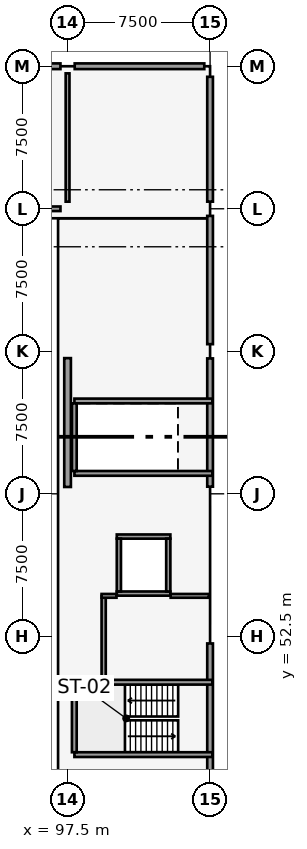
"""IFC4 building model, lengths in metres.
Left out: names, types, materials, properties, quantities, classifications, styles, units other than length and angle.
Written with IfcOpenShell. Run it as: python <this file> out.ifc"""

import sys

from ifc_helpers import new_model, si_unit, direction, frame, frame_2d, origin, origin_2d, place, context, subcontext, project, spatial, rectangle, extrude, element, fill, save


model = new_model("IFC4")
c1 = context("Model", 3, precision=1e-05, world=origin(), true_north=direction((0.0, 1.0)))
c2 = subcontext(c1, "Body", "Model", "MODEL_VIEW")
j1 = project(units=[si_unit("LENGTHUNIT", "METRE"), si_unit("PLANEANGLEUNIT", "RADIAN")], contexts=[c1])
p1 = place(None, origin())
s1 = spatial("IfcSite", under=j1, at=p1, CompositionType="ELEMENT")
p2 = place(p1, origin())
s2 = spatial("IfcBuilding", under=s1, at=p2, CompositionType="ELEMENT")
p3 = place(p2, frame((0.0, 0.0, 13.2)))
s3 = spatial("IfcBuildingStorey", under=s2, at=p3, CompositionType="ELEMENT", Elevation=13.2)
for number, where, z_axis, x_axis in (
    (1, (97.5, 52.5, 0.0), (0.0, 0.0, 1.0), (1.0, 0.0, 0.0)),
    (2, (97.5, 60.0, 0.0), (0.0, 0.0, 1.0), (1.0, 0.0, 0.0)),
    (3, (97.5, 67.5, 0.0), (0.0, 0.0, 1.0), (1.0, 0.0, 0.0)),
    (4, (97.5, 75.0, 0.0), (0.0, 0.0, 1.0), (1.0, 0.0, 0.0)),
    (5, (97.5, 82.5, 0.0), (0.0, 0.0, 1.0), (1.0, 0.0, 0.0)),
    (6, (105.0, 52.5, 0.0), (0.0, 0.0, 1.0), (1.0, 0.0, 0.0)),
    (7, (105.0, 60.0, 0.0), (0.0, 0.0, 1.0), (1.0, 0.0, 0.0)),
    (8, (105.0, 67.5, 0.0), (0.0, 0.0, 1.0), (1.0, 0.0, 0.0)),
    (9, (105.0, 75.0, 0.0), (0.0, 0.0, 1.0), (1.0, 0.0, 0.0)),
):
    element("IfcColumn", number, at=place(p3, frame(where, z_axis=z_axis, x_axis=x_axis)), inside=s3, PredefinedType="COLUMN", context=c2, shape_type="SweptSolid", body=[
        extrude(rectangle(XDim=0.72, YDim=0.72, at=origin_2d()), origin(), (0.0, 0.0, 1.0), 3.9),
    ])
p4 = place(p3, frame((105.0, 82.5, 0.0), z_axis=(0.0, 0.0, 1.0), x_axis=(1.0, 0.0, 0.0)))
e10 = element("IfcColumn", 10, at=p4, inside=s3, PredefinedType="COLUMN", context=c2, shape_type="SweptSolid", body=[
    extrude(rectangle(XDim=0.6, YDim=1.1, at=origin_2d()), origin(), (0.0, 0.0, 1.0), 3.9),
])
p5 = place(p3, frame((97.5, 60.36, 0.0), z_axis=(0.0, 0.0, 1.0), x_axis=(0.0, 1.0, 0.0)))
e11 = element("IfcWall", 11, at=p5, inside=s3, PredefinedType="SHEAR", context=c2, shape_type="SweptSolid", body=[
    extrude(rectangle(XDim=6.78, YDim=0.35, at=frame_2d((3.39, 0.0))), origin(), (0.0, 0.0, 1.0), 2.67),
])
p6 = place(p3, frame((105.0, 45.375, 0.0), z_axis=(0.0, 0.0, 1.0), x_axis=(0.0, 1.0, 0.0)))
e12 = element("IfcWall", 12, at=p6, inside=s3, PredefinedType="SOLIDWALL", context=c2, shape_type="SweptSolid", body=[
    extrude(rectangle(XDim=6.75, YDim=0.3, at=frame_2d((3.375, 0.0))), origin(), (0.0, 0.0, 1.0), 2.54),
])
p7 = place(p3, frame((105.0, 60.375, 0.0), z_axis=(0.0, 0.0, 1.0), x_axis=(0.0, 1.0, 0.0)))
e13 = element("IfcWall", 13, at=p7, inside=s3, PredefinedType="SOLIDWALL", context=c2, shape_type="SweptSolid", body=[
    extrude(rectangle(XDim=6.75, YDim=0.3, at=frame_2d((3.375, 0.0))), origin(), (0.0, 0.0, 1.0), 2.64),
])
p8 = place(p3, frame((105.0, 67.875, 0.0), z_axis=(0.0, 0.0, 1.0), x_axis=(0.0, 1.0, 0.0)))
e14 = element("IfcWall", 14, at=p8, inside=s3, PredefinedType="SOLIDWALL", context=c2, shape_type="SweptSolid", body=[
    extrude(rectangle(XDim=6.75, YDim=0.3, at=frame_2d((3.375, 0.0))), origin(), (0.0, 0.0, 1.0), 2.69),
])
p9 = place(p3, frame((105.0, 75.375, 0.0), z_axis=(0.0, 0.0, 1.0), x_axis=(0.0, 1.0, 0.0)))
e15 = element("IfcWall", 15, at=p9, inside=s3, PredefinedType="SOLIDWALL", context=c2, shape_type="SweptSolid", body=[
    extrude(rectangle(XDim=6.57, YDim=0.3, at=frame_2d((3.285, 0.0))), origin(), (0.0, 0.0, 1.0), 2.74),
])
p10 = place(p9, frame((1.21, 0.0, 0.6)))
e16 = element("IfcOpeningElement", 16, at=p10, cuts=e15, PredefinedType="OPENING", context=c2, shape_type="SweptSolid", body=[
    extrude(rectangle(XDim=1.2, YDim=1.2, at=frame_2d((0.6, 0.6))), frame((0.0, 0.16, 0.0), z_axis=(0.0, -1.0, 0.0), x_axis=(1.0, 0.0, 0.0)), (0.0, 0.0, 1.0), 0.32),
])
p11 = place(p3, frame((90.375, 82.5, 0.0), z_axis=(0.0, 0.0, 1.0), x_axis=(1.0, 0.0, 0.0)))
e17 = element("IfcWall", 17, at=p11, inside=s3, PredefinedType="SOLIDWALL", context=c2, shape_type="SweptSolid", body=[
    extrude(rectangle(XDim=6.75, YDim=0.3, at=frame_2d((3.375, 0.0))), origin(), (0.0, 0.0, 1.0), 2.84),
])
p12 = place(p11, frame((2.625, 0.0, 0.6)))
e18 = element("IfcOpeningElement", 18, at=p12, cuts=e17, PredefinedType="OPENING", context=c2, shape_type="SweptSolid", body=[
    extrude(rectangle(XDim=1.5, YDim=1.2, at=frame_2d((0.75, 0.6))), frame((0.0, 0.16, 0.0), z_axis=(0.0, -1.0, 0.0), x_axis=(1.0, 0.0, 0.0)), (0.0, 0.0, 1.0), 0.32),
])
p13 = place(p3, frame((97.875, 82.5, 0.0), z_axis=(0.0, 0.0, 1.0), x_axis=(1.0, 0.0, 0.0)))
e19 = element("IfcWall", 19, at=p13, inside=s3, PredefinedType="SOLIDWALL", context=c2, shape_type="SweptSolid", body=[
    extrude(rectangle(XDim=6.82, YDim=0.3, at=frame_2d((3.41, 0.0))), origin(), (0.0, 0.0, 1.0), 2.84),
])
p14 = place(p13, frame((2.475, 0.0, 0.6)))
e20 = element("IfcOpeningElement", 20, at=p14, cuts=e19, PredefinedType="OPENING", context=c2, shape_type="SweptSolid", body=[
    extrude(rectangle(XDim=1.8, YDim=1.2, at=frame_2d((0.9, 0.6))), frame((0.0, 0.16, 0.0), z_axis=(0.0, -1.0, 0.0), x_axis=(1.0, 0.0, 0.0)), (0.0, 0.0, 1.0), 0.32),
])
p15 = place(p3, frame((97.86, 46.275, 0.0), z_axis=(0.0, 0.0, 1.0), x_axis=(1.0, 0.0, 0.0)))
e21 = element("IfcWall", 21, at=p15, inside=s3, PredefinedType="SOLIDWALL", context=c2, shape_type="SweptSolid", body=[
    extrude(rectangle(XDim=7.26, YDim=0.25, at=frame_2d((3.63, 0.0))), origin(), (0.0, 0.0, 1.0), 3.62),
])
p16 = place(p15, frame((5.54, 0.0, 0.0)))
e22 = element("IfcOpeningElement", 22, at=p16, cuts=e21, PredefinedType="OPENING", context=c2, shape_type="SweptSolid", body=[
    extrude(rectangle(XDim=1.1, YDim=2.15, at=frame_2d((0.55, 1.075))), frame((0.0, 0.135, 0.0), z_axis=(0.0, -1.0, 0.0), x_axis=(1.0, 0.0, 0.0)), (0.0, 0.0, 1.0), 0.27),
])
p17 = place(p3, frame((97.86, 50.085, 0.0), z_axis=(0.0, 0.0, 1.0), x_axis=(1.0, 0.0, 0.0)))
e23 = element("IfcWall", 23, at=p17, inside=s3, PredefinedType="SOLIDWALL", context=c2, shape_type="SweptSolid", body=[
    extrude(rectangle(XDim=7.26, YDim=0.25, at=frame_2d((3.63, 0.0))), origin(), (0.0, 0.0, 1.0), 3.62),
])
p18 = place(p17, frame((5.54, 0.0, 0.0)))
e24 = element("IfcOpeningElement", 24, at=p18, cuts=e23, PredefinedType="OPENING", context=c2, shape_type="SweptSolid", body=[
    extrude(rectangle(XDim=1.1, YDim=2.15, at=frame_2d((0.55, 1.075))), frame((0.0, 0.135, 0.0), z_axis=(0.0, -1.0, 0.0), x_axis=(1.0, 0.0, 0.0)), (0.0, 0.0, 1.0), 0.27),
])
p19 = place(p3, frame((97.855, 46.4, 0.0), z_axis=(0.0, 0.0, 1.0), x_axis=(0.0, 1.0, 0.0)))
e25 = element("IfcWall", 25, at=p19, inside=s3, PredefinedType="SOLIDWALL", context=c2, shape_type="SweptSolid", body=[
    extrude(rectangle(XDim=3.56, YDim=0.25, at=frame_2d((1.78, 0.0))), origin(), (0.0, 0.0, 1.0), 3.62),
])
p20 = place(p3, frame((97.86, 61.075, 0.0), z_axis=(0.0, 0.0, 1.0), x_axis=(1.0, 0.0, 0.0)))
e26 = element("IfcWall", 26, at=p20, inside=s3, PredefinedType="SOLIDWALL", context=c2, shape_type="SweptSolid", body=[
    extrude(rectangle(XDim=7.26, YDim=0.25, at=frame_2d((3.63, 0.0))), origin(), (0.0, 0.0, 1.0), 3.62),
])
p21 = place(p20, frame((5.54, 0.0, 0.0)))
e27 = element("IfcOpeningElement", 27, at=p21, cuts=e26, PredefinedType="OPENING", context=c2, shape_type="SweptSolid", body=[
    extrude(rectangle(XDim=1.1, YDim=2.15, at=frame_2d((0.55, 1.075))), frame((0.0, 0.135, 0.0), z_axis=(0.0, -1.0, 0.0), x_axis=(1.0, 0.0, 0.0)), (0.0, 0.0, 1.0), 0.27),
])
p22 = place(p3, frame((97.86, 64.885, 0.0), z_axis=(0.0, 0.0, 1.0), x_axis=(1.0, 0.0, 0.0)))
e28 = element("IfcWall", 28, at=p22, inside=s3, PredefinedType="SOLIDWALL", context=c2, shape_type="SweptSolid", body=[
    extrude(rectangle(XDim=7.26, YDim=0.25, at=frame_2d((3.63, 0.0))), origin(), (0.0, 0.0, 1.0), 3.62),
])
p23 = place(p22, frame((5.54, 0.0, 0.0)))
e29 = element("IfcOpeningElement", 29, at=p23, cuts=e28, PredefinedType="OPENING", context=c2, shape_type="SweptSolid", body=[
    extrude(rectangle(XDim=1.1, YDim=2.15, at=frame_2d((0.55, 1.075))), frame((0.0, 0.135, 0.0), z_axis=(0.0, -1.0, 0.0), x_axis=(1.0, 0.0, 0.0)), (0.0, 0.0, 1.0), 0.27),
])
p24 = place(p3, frame((97.855, 61.2, 0.0), z_axis=(0.0, 0.0, 1.0), x_axis=(0.0, 1.0, 0.0)))
e30 = element("IfcWall", 30, at=p24, inside=s3, PredefinedType="SOLIDWALL", context=c2, shape_type="SweptSolid", body=[
    extrude(rectangle(XDim=3.56, YDim=0.25, at=frame_2d((1.78, 0.0))), origin(), (0.0, 0.0, 1.0), 3.62),
])
p25 = place(p3, frame((100.09, 54.75, 0.0), z_axis=(0.0, 0.0, 1.0), x_axis=(1.0, 0.0, 0.0)))
e31 = element("IfcWall", 31, at=p25, inside=s3, PredefinedType="SOLIDWALL", context=c2, shape_type="SweptSolid", body=[
    extrude(rectangle(XDim=2.82, YDim=0.22, at=frame_2d((1.41, 0.0))), origin(), (0.0, 0.0, 1.0), 3.62),
])
p26 = place(p25, frame((0.86, 0.0, 0.0)))
e32 = element("IfcOpeningElement", 32, at=p26, cuts=e31, PredefinedType="OPENING", context=c2, shape_type="SweptSolid", body=[
    extrude(rectangle(XDim=1.1, YDim=2.15, at=frame_2d((0.55, 1.075))), frame((0.0, 0.12, 0.0), z_axis=(0.0, -1.0, 0.0), x_axis=(1.0, 0.0, 0.0)), (0.0, 0.0, 1.0), 0.24),
])
p27 = place(p3, frame((100.09, 57.75, 0.0), z_axis=(0.0, 0.0, 1.0), x_axis=(1.0, 0.0, 0.0)))
e33 = element("IfcWall", 33, at=p27, inside=s3, PredefinedType="SOLIDWALL", context=c2, shape_type="SweptSolid", body=[
    extrude(rectangle(XDim=2.82, YDim=0.22, at=frame_2d((1.41, 0.0))), origin(), (0.0, 0.0, 1.0), 3.62),
])
for number, where, z_axis, x_axis in (
    (34, (100.2, 54.86, 0.0), (0.0, 0.0, 1.0), (0.0, 1.0, 0.0)),
    (35, (102.8, 54.86, 0.0), (0.0, 0.0, 1.0), (0.0, 1.0, 0.0)),
):
    element("IfcWall", number, at=place(p3, frame(where, z_axis=z_axis, x_axis=x_axis)), inside=s3, PredefinedType="SOLIDWALL", context=c2, shape_type="SweptSolid", body=[
        extrude(rectangle(XDim=2.78, YDim=0.22, at=frame_2d((1.39, 0.0))), origin(), (0.0, 0.0, 1.0), 3.62),
    ])
p28 = place(p3, frame((99.4, 50.22, 0.0), z_axis=(0.0, 0.0, 1.0), x_axis=(0.0, 1.0, 0.0)))
e36 = element("IfcWall", 36, at=p28, inside=s3, PredefinedType="SOLIDWALL", context=c2, shape_type="SweptSolid", body=[
    extrude(rectangle(XDim=4.41, YDim=0.22, at=frame_2d((2.205, 0.0))), origin(), (0.0, 0.0, 1.0), 3.62),
])
p29 = place(p28, frame((0.45, 0.0, 0.0)))
e37 = element("IfcOpeningElement", 37, at=p29, cuts=e36, PredefinedType="OPENING", context=c2, shape_type="SweptSolid", body=[
    extrude(rectangle(XDim=1.1, YDim=2.15, at=frame_2d((0.55, 1.075))), frame((0.0, 0.12, 0.0), z_axis=(0.0, -1.0, 0.0), x_axis=(1.0, 0.0, 0.0)), (0.0, 0.0, 1.0), 0.24),
])
p30 = place(p3, frame((99.29, 54.63, 0.0), z_axis=(0.0, 0.0, 1.0), x_axis=(1.0, 0.0, 0.0)))
e38 = element("IfcWall", 38, at=p30, inside=s3, PredefinedType="PARTITIONING", context=c2, shape_type="SweptSolid", body=[
    extrude(rectangle(XDim=0.785, YDim=0.2, at=frame_2d((0.393, 0.0))), origin(), (0.0, 0.0, 1.0), 3.6),
])
p31 = place(p3, frame((102.925, 54.63, 0.0), z_axis=(0.0, 0.0, 1.0), x_axis=(1.0, 0.0, 0.0)))
e39 = element("IfcWall", 39, at=p31, inside=s3, PredefinedType="PARTITIONING", context=c2, shape_type="SweptSolid", body=[
    extrude(rectangle(XDim=2.015, YDim=0.2, at=frame_2d((1.007, 0.0))), origin(), (0.0, 0.0, 1.0), 2.85),
])
p32 = place(p3, frame((90.374, 75.0, 0.0), z_axis=(0.0, 0.0, 1.0), x_axis=(1.0, 0.0, 0.0)))
e40 = element("IfcWall", 40, at=p32, inside=s3, PredefinedType="PARTITIONING", context=c2, shape_type="SweptSolid", body=[
    extrude(rectangle(XDim=6.752, YDim=0.24, at=frame_2d((3.376, 0.0))), origin(), (0.0, 0.0, 1.0), 2.54),
])
p33 = place(p3, frame((97.5, 75.374, 0.0), z_axis=(0.0, 0.0, 1.0), x_axis=(0.0, 1.0, 0.0)))
e41 = element("IfcWall", 41, at=p33, inside=s3, PredefinedType="PARTITIONING", context=c2, shape_type="SweptSolid", body=[
    extrude(rectangle(XDim=6.752, YDim=0.2, at=frame_2d((3.376, 0.0))), origin(), (0.0, 0.0, 1.0), 2.54),
])
p34 = place(p33, frame((2.576, 0.0, 0.0)))
e42 = element("IfcOpeningElement", 42, at=p34, cuts=e41, PredefinedType="OPENING", context=c2, shape_type="SweptSolid", body=[
    extrude(rectangle(XDim=1.6, YDim=2.15, at=frame_2d((0.8, 1.075))), frame((0.0, 0.11, 0.0), z_axis=(0.0, -1.0, 0.0), x_axis=(1.0, 0.0, 0.0)), (0.0, 0.0, 1.0), 0.22),
])
p35 = place(p10, origin())
e43 = element("IfcWindow", 43, at=p35, inside=s3, PartitioningType="SINGLE_PANEL", PredefinedType="WINDOW", context=c2, shape_type="SweptSolid", body=[
    extrude(rectangle(XDim=1.2, YDim=1.2, at=frame_2d((0.6, 0.6))), frame((0.0, 0.03, 0.0), z_axis=(0.0, -1.0, 0.0), x_axis=(1.0, 0.0, 0.0)), (0.0, 0.0, 1.0), 0.06),
])
fill(e16, e43)
p36 = place(p14, origin())
e44 = element("IfcWindow", 44, at=p36, inside=s3, PartitioningType="SINGLE_PANEL", PredefinedType="WINDOW", context=c2, shape_type="SweptSolid", body=[
    extrude(rectangle(XDim=1.8, YDim=1.2, at=frame_2d((0.9, 0.6))), frame((0.0, 0.03, 0.0), z_axis=(0.0, -1.0, 0.0), x_axis=(1.0, 0.0, 0.0)), (0.0, 0.0, 1.0), 0.06),
])
fill(e20, e44)
p37 = place(p16, origin())
e45 = element("IfcDoor", 45, at=p37, inside=s3, OperationType="SINGLE_SWING_LEFT", PredefinedType="DOOR", context=c2, shape_type="SweptSolid", body=[
    extrude(rectangle(XDim=1.1, YDim=2.15, at=frame_2d((0.55, 1.075))), frame((0.0, 0.025, 0.0), z_axis=(0.0, -1.0, 0.0), x_axis=(1.0, 0.0, 0.0)), (0.0, 0.0, 1.0), 0.05),
])
fill(e22, e45)
p38 = place(p18, frame((1.1, 0.0, 0.0), z_axis=(0.0, 0.0, 1.0), x_axis=(-1.0, 0.0, 0.0)))
e46 = element("IfcDoor", 46, at=p38, inside=s3, OperationType="SINGLE_SWING_RIGHT", PredefinedType="DOOR", context=c2, shape_type="SweptSolid", body=[
    extrude(rectangle(XDim=1.1, YDim=2.15, at=frame_2d((0.55, 1.075))), frame((0.0, 0.025, 0.0), z_axis=(0.0, -1.0, 0.0), x_axis=(1.0, 0.0, 0.0)), (0.0, 0.0, 1.0), 0.05),
])
fill(e24, e46)
p39 = place(p21, origin())
e47 = element("IfcDoor", 47, at=p39, inside=s3, OperationType="SINGLE_SWING_LEFT", PredefinedType="DOOR", context=c2, shape_type="SweptSolid", body=[
    extrude(rectangle(XDim=1.1, YDim=2.15, at=frame_2d((0.55, 1.075))), frame((0.0, 0.025, 0.0), z_axis=(0.0, -1.0, 0.0), x_axis=(1.0, 0.0, 0.0)), (0.0, 0.0, 1.0), 0.05),
])
fill(e27, e47)
p40 = place(p23, frame((1.1, 0.0, 0.0), z_axis=(0.0, 0.0, 1.0), x_axis=(-1.0, 0.0, 0.0)))
e48 = element("IfcDoor", 48, at=p40, inside=s3, OperationType="SINGLE_SWING_RIGHT", PredefinedType="DOOR", context=c2, shape_type="SweptSolid", body=[
    extrude(rectangle(XDim=1.1, YDim=2.15, at=frame_2d((0.55, 1.075))), frame((0.0, 0.025, 0.0), z_axis=(0.0, -1.0, 0.0), x_axis=(1.0, 0.0, 0.0)), (0.0, 0.0, 1.0), 0.05),
])
fill(e29, e48)
p41 = place(p26, origin())
e49 = element("IfcDoor", 49, at=p41, inside=s3, OperationType="SLIDING_TO_LEFT", PredefinedType="DOOR", context=c2, shape_type="SweptSolid", body=[
    extrude(rectangle(XDim=1.1, YDim=2.15, at=frame_2d((0.55, 1.075))), frame((0.0, 0.025, 0.0), z_axis=(0.0, -1.0, 0.0), x_axis=(1.0, 0.0, 0.0)), (0.0, 0.0, 1.0), 0.05),
])
fill(e32, e49)
p42 = place(p29, origin())
e50 = element("IfcDoor", 50, at=p42, inside=s3, OperationType="SINGLE_SWING_RIGHT", PredefinedType="DOOR", context=c2, shape_type="SweptSolid", body=[
    extrude(rectangle(XDim=1.1, YDim=2.15, at=frame_2d((0.55, 1.075))), frame((0.0, 0.025, 0.0), z_axis=(0.0, -1.0, 0.0), x_axis=(1.0, 0.0, 0.0)), (0.0, 0.0, 1.0), 0.05),
])
fill(e37, e50)
p43 = place(p34, origin())
e51 = element("IfcDoor", 51, at=p43, inside=s3, OperationType="SINGLE_SWING_LEFT", PredefinedType="DOOR", context=c2, shape_type="SweptSolid", body=[
    extrude(rectangle(XDim=1.6, YDim=2.15, at=frame_2d((0.8, 1.075))), frame((0.0, 0.025, 0.0), z_axis=(0.0, -1.0, 0.0), x_axis=(1.0, 0.0, 0.0)), (0.0, 0.0, 1.0), 0.05),
])
fill(e42, e51)
save(model, sys.argv[1])
